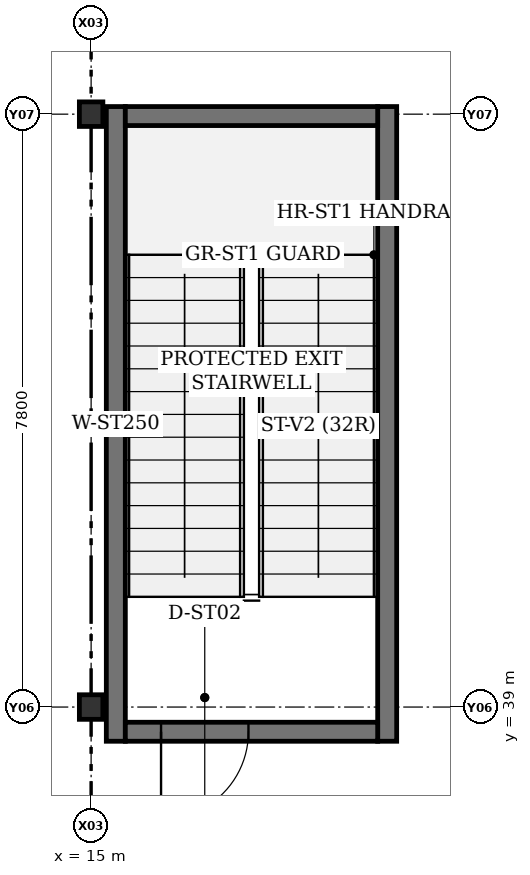
"""IFC4 building model, lengths in metres.
Left out: names, types, materials, properties, quantities, classifications, styles, units other than length and angle.
Written with IfcOpenShell. Run it as: python <this file> out.ifc"""

import sys

from ifc_helpers import new_model, si_unit, direction, frame, frame_2d, origin, origin_2d, place, context, subcontext, project, spatial, rectangle, i_section, extrude, element, fill, save


model = new_model("IFC4")
c1 = context("Model", 3, precision=1e-05, world=origin(), true_north=direction((0.0, 1.0)))
c2 = subcontext(c1, "Body", "Model", "MODEL_VIEW")
j1 = project(units=[si_unit("LENGTHUNIT", "METRE"), si_unit("PLANEANGLEUNIT", "RADIAN")], contexts=[c1])
p1 = place(None, origin())
s1 = spatial("IfcSite", under=j1, at=p1, CompositionType="ELEMENT")
p2 = place(p1, origin())
s2 = spatial("IfcBuilding", under=s1, at=p2, CompositionType="ELEMENT")
p3 = place(p2, origin())
s3 = spatial("IfcBuildingStorey", under=s2, at=p3, CompositionType="ELEMENT", Elevation=0.0)
for number, where, z_axis, x_axis in (
    (1, (15.0, 39.0, 0.0), (0.0, 0.0, 1.0), (1.0, 0.0, 0.0)),
    (2, (15.0, 46.8, 0.0), (0.0, 0.0, 1.0), (1.0, 0.0, 0.0)),
):
    element("IfcColumn", number, at=place(p3, frame(where, z_axis=z_axis, x_axis=x_axis)), inside=s3, PredefinedType="COLUMN", context=c2, shape_type="SweptSolid", body=[
        extrude(i_section(OverallWidth=0.309, OverallDepth=0.323, WebThickness=0.014, FlangeThickness=0.023, FilletRadius=0.015, at=origin_2d()), origin(), (0.0, 0.0, 1.0), 5.4),
    ])
for number, where, z_axis, x_axis in (
    (3, (15.325, 38.55, 0.0), (0.0, 0.0, 1.0), (0.0, 1.0, 0.0)),
    (4, (18.895, 38.55, 0.0), (0.0, 0.0, 1.0), (0.0, 1.0, 0.0)),
):
    element("IfcWall", number, at=place(p3, frame(where, z_axis=z_axis, x_axis=x_axis)), inside=s3, PredefinedType="SHEAR", context=c2, shape_type="SweptSolid", body=[
        extrude(rectangle(XDim=8.35, YDim=0.25, at=frame_2d((4.175, 0.0))), origin(), (0.0, 0.0, 1.0), 5.4),
    ])
p4 = place(p3, frame((15.45, 46.775, 0.0), z_axis=(0.0, 0.0, 1.0), x_axis=(1.0, 0.0, 0.0)))
e5 = element("IfcWall", 5, at=p4, inside=s3, PredefinedType="SHEAR", context=c2, shape_type="SweptSolid", body=[
    extrude(rectangle(XDim=3.32, YDim=0.25, at=frame_2d((1.66, 0.0))), origin(), (0.0, 0.0, 1.0), 5.4),
])
p5 = place(p3, frame((18.77, 38.675, 0.0), z_axis=(0.0, 0.0, 1.0), x_axis=(-1.0, 0.0, 0.0)))
e6 = element("IfcWall", 6, at=p5, inside=s3, PredefinedType="SHEAR", context=c2, shape_type="SweptSolid", body=[
    extrude(rectangle(XDim=3.32, YDim=0.25, at=frame_2d((1.66, 0.0))), origin(), (0.0, 0.0, 1.0), 5.4),
])
p6 = place(p5, frame((1.7, 0.0, 0.0)))
e7 = element("IfcOpeningElement", 7, at=p6, cuts=e6, PredefinedType="OPENING", context=c2, shape_type="SweptSolid", body=[
    extrude(rectangle(XDim=1.15, YDim=2.15, at=frame_2d((0.575, 1.075))), frame((0.0, 0.125, 0.0), z_axis=(0.0, -1.0, 0.0), x_axis=(1.0, 0.0, 0.0)), (0.0, 0.0, 1.0), 0.25),
])
p7 = place(p6, origin())
e8 = element("IfcDoor", 8, at=p7, inside=s3, OperationType="SINGLE_SWING_RIGHT", PredefinedType="DOOR", context=c2, shape_type="SweptSolid", body=[
    extrude(rectangle(XDim=1.15, YDim=2.15, at=frame_2d((0.575, 1.075))), frame((0.0, 0.025, 0.0), z_axis=(0.0, -1.0, 0.0), x_axis=(1.0, 0.0, 0.0)), (0.0, 0.0, 1.0), 0.05),
])
fill(e7, e8)
save(model, sys.argv[1])
